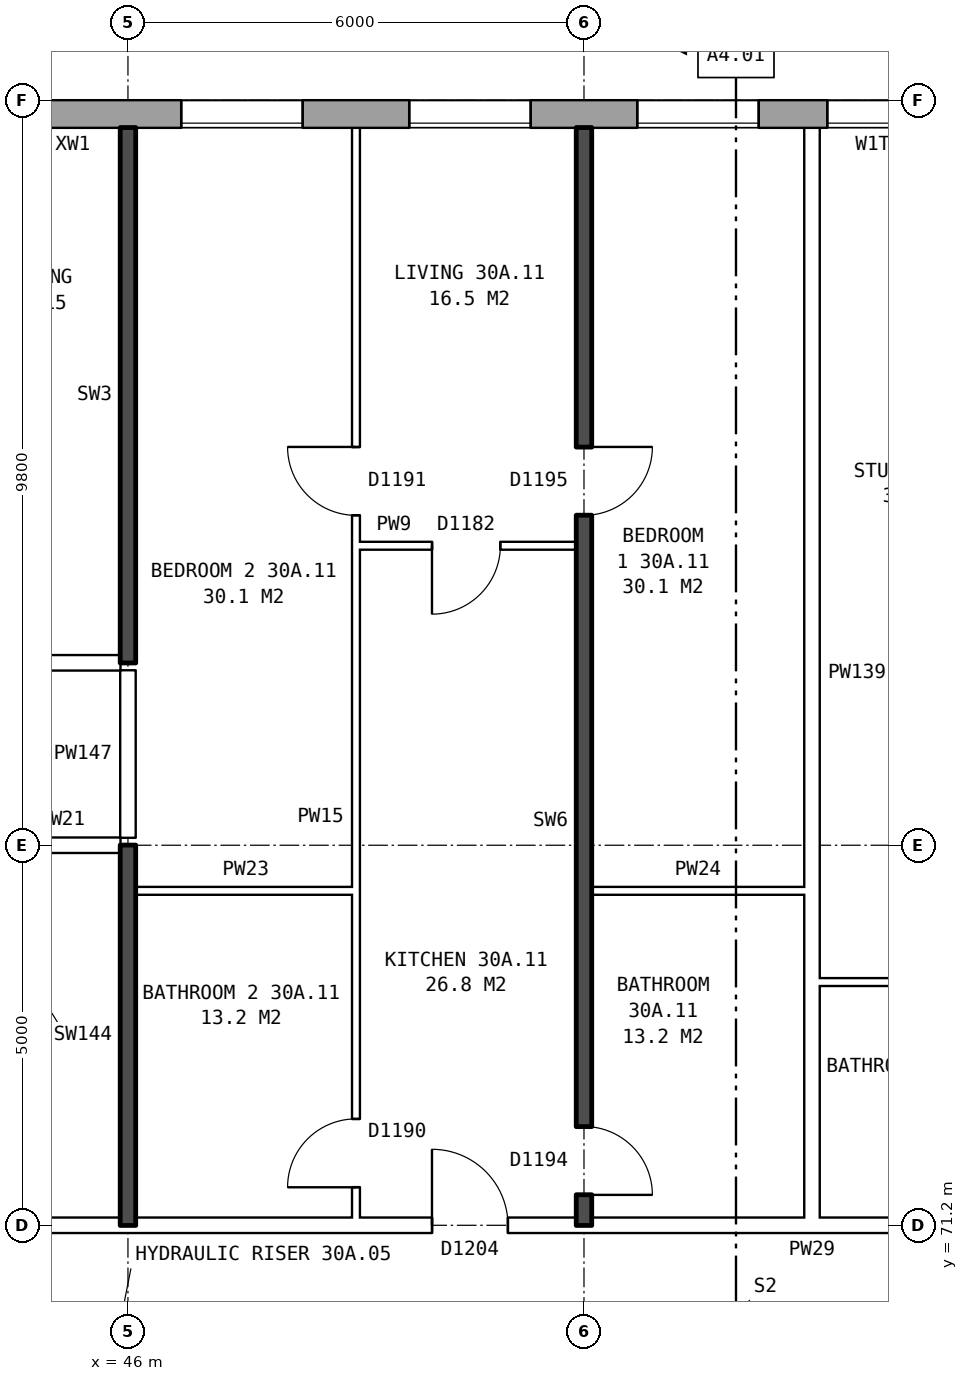
"""IFC4 building model, lengths in metres.
Left out: names, types, materials, properties, quantities, classifications, styles, units other than length and angle.
Written with IfcOpenShell. Run it as: python <this file> out.ifc"""

import sys

from ifc_helpers import new_model, si_unit, direction, frame, frame_2d, origin, place, context, subcontext, project, spatial, rectangle, extrude, element, fill, save


model = new_model("IFC4")
c1 = context("Model", 3, precision=1e-05, world=origin(), true_north=direction((0.0, 1.0)))
c2 = subcontext(c1, "Body", "Model", "MODEL_VIEW")
j1 = project(units=[si_unit("LENGTHUNIT", "METRE"), si_unit("PLANEANGLEUNIT", "RADIAN")], contexts=[c1])
p1 = place(None, origin())
s1 = spatial("IfcSite", under=j1, at=p1, CompositionType="ELEMENT")
p2 = place(p1, origin())
s2 = spatial("IfcBuilding", under=s1, at=p2, CompositionType="ELEMENT")
p3 = place(p2, frame((0.0, 0.0, 108.8)))
s3 = spatial("IfcBuildingStorey", under=s2, at=p3, CompositionType="ELEMENT", Elevation=108.8)
p4 = place(p3, frame((72.925, 85.82, 0.0), z_axis=(0.0, 0.0, 1.0), x_axis=(-1.0, 0.0, 0.0)))
e1 = element("IfcWall", 1, at=p4, inside=s3, PredefinedType="STANDARD", context=c2, shape_type="SweptSolid", body=[
    extrude(rectangle(XDim=44.851, YDim=0.36, at=frame_2d((22.425, 0.0))), origin(), (0.0, 0.0, 1.0), 2.85),
])
p5 = place(p4, frame((0.625, 0.0, 0.8)))
e2 = element("IfcOpeningElement", 2, at=p5, cuts=e1, PredefinedType="OPENING", context=c2, shape_type="SweptSolid", body=[
    extrude(rectangle(XDim=1.6, YDim=1.8, at=frame_2d((0.8, 0.9))), frame((0.0, 0.19, 0.0), z_axis=(0.0, -1.0, 0.0), x_axis=(1.0, 0.0, 0.0)), (0.0, 0.0, 1.0), 0.38),
])
p6 = place(p4, frame((3.625, 0.0, 0.8)))
e3 = element("IfcOpeningElement", 3, at=p6, cuts=e1, PredefinedType="OPENING", context=c2, shape_type="SweptSolid", body=[
    extrude(rectangle(XDim=1.6, YDim=1.8, at=frame_2d((0.8, 0.9))), frame((0.0, 0.19, 0.0), z_axis=(0.0, -1.0, 0.0), x_axis=(1.0, 0.0, 0.0)), (0.0, 0.0, 1.0), 0.38),
])
p7 = place(p4, frame((6.625, 0.0, 0.8)))
e4 = element("IfcOpeningElement", 4, at=p7, cuts=e1, PredefinedType="OPENING", context=c2, shape_type="SweptSolid", body=[
    extrude(rectangle(XDim=1.6, YDim=1.8, at=frame_2d((0.8, 0.9))), frame((0.0, 0.19, 0.0), z_axis=(0.0, -1.0, 0.0), x_axis=(1.0, 0.0, 0.0)), (0.0, 0.0, 1.0), 0.38),
])
p8 = place(p4, frame((9.625, 0.0, 0.8)))
e5 = element("IfcOpeningElement", 5, at=p8, cuts=e1, PredefinedType="OPENING", context=c2, shape_type="SweptSolid", body=[
    extrude(rectangle(XDim=1.6, YDim=1.8, at=frame_2d((0.8, 0.9))), frame((0.0, 0.19, 0.0), z_axis=(0.0, -1.0, 0.0), x_axis=(1.0, 0.0, 0.0)), (0.0, 0.0, 1.0), 0.38),
])
p9 = place(p4, frame((12.625, 0.0, 0.8)))
e6 = element("IfcOpeningElement", 6, at=p9, cuts=e1, PredefinedType="OPENING", context=c2, shape_type="SweptSolid", body=[
    extrude(rectangle(XDim=1.6, YDim=1.8, at=frame_2d((0.8, 0.9))), frame((0.0, 0.19, 0.0), z_axis=(0.0, -1.0, 0.0), x_axis=(1.0, 0.0, 0.0)), (0.0, 0.0, 1.0), 0.38),
])
p10 = place(p4, frame((15.125, 0.0, 1.65)))
e7 = element("IfcOpeningElement", 7, at=p10, cuts=e1, PredefinedType="OPENING", context=c2, shape_type="SweptSolid", body=[
    extrude(rectangle(XDim=1.0, YDim=0.9, at=frame_2d((0.5, 0.45))), frame((0.0, 0.19, 0.0), z_axis=(0.0, -1.0, 0.0), x_axis=(1.0, 0.0, 0.0)), (0.0, 0.0, 1.0), 0.38),
])
p11 = place(p4, frame((18.625, 0.0, 0.8)))
e8 = element("IfcOpeningElement", 8, at=p11, cuts=e1, PredefinedType="OPENING", context=c2, shape_type="SweptSolid", body=[
    extrude(rectangle(XDim=1.6, YDim=1.8, at=frame_2d((0.8, 0.9))), frame((0.0, 0.19, 0.0), z_axis=(0.0, -1.0, 0.0), x_axis=(1.0, 0.0, 0.0)), (0.0, 0.0, 1.0), 0.38),
])
p12 = place(p4, frame((21.625, 0.0, 0.8)))
e9 = element("IfcOpeningElement", 9, at=p12, cuts=e1, PredefinedType="OPENING", context=c2, shape_type="SweptSolid", body=[
    extrude(rectangle(XDim=1.6, YDim=1.8, at=frame_2d((0.8, 0.9))), frame((0.0, 0.19, 0.0), z_axis=(0.0, -1.0, 0.0), x_axis=(1.0, 0.0, 0.0)), (0.0, 0.0, 1.0), 0.38),
])
p13 = place(p4, frame((24.625, 0.0, 0.8)))
e10 = element("IfcOpeningElement", 10, at=p13, cuts=e1, PredefinedType="OPENING", context=c2, shape_type="SweptSolid", body=[
    extrude(rectangle(XDim=1.6, YDim=1.8, at=frame_2d((0.8, 0.9))), frame((0.0, 0.19, 0.0), z_axis=(0.0, -1.0, 0.0), x_axis=(1.0, 0.0, 0.0)), (0.0, 0.0, 1.0), 0.38),
])
p14 = place(p4, frame((29.075, 0.0, 1.4)))
e11 = element("IfcOpeningElement", 11, at=p14, cuts=e1, PredefinedType="OPENING", context=c2, shape_type="SweptSolid", body=[
    extrude(rectangle(XDim=1.2, YDim=1.2, at=frame_2d((0.6, 0.6))), frame((0.0, 0.19, 0.0), z_axis=(0.0, -1.0, 0.0), x_axis=(1.0, 0.0, 0.0)), (0.0, 0.0, 1.0), 0.38),
])
p15 = place(p4, frame((30.625, 0.0, 0.8)))
e12 = element("IfcOpeningElement", 12, at=p15, cuts=e1, PredefinedType="OPENING", context=c2, shape_type="SweptSolid", body=[
    extrude(rectangle(XDim=1.6, YDim=1.8, at=frame_2d((0.8, 0.9))), frame((0.0, 0.19, 0.0), z_axis=(0.0, -1.0, 0.0), x_axis=(1.0, 0.0, 0.0)), (0.0, 0.0, 1.0), 0.38),
])
p16 = place(p4, frame((33.625, 0.0, 0.8)))
e13 = element("IfcOpeningElement", 13, at=p16, cuts=e1, PredefinedType="OPENING", context=c2, shape_type="SweptSolid", body=[
    extrude(rectangle(XDim=1.6, YDim=1.8, at=frame_2d((0.8, 0.9))), frame((0.0, 0.19, 0.0), z_axis=(0.0, -1.0, 0.0), x_axis=(1.0, 0.0, 0.0)), (0.0, 0.0, 1.0), 0.38),
])
p17 = place(p4, frame((36.625, 0.0, 0.8)))
e14 = element("IfcOpeningElement", 14, at=p17, cuts=e1, PredefinedType="OPENING", context=c2, shape_type="SweptSolid", body=[
    extrude(rectangle(XDim=1.6, YDim=1.8, at=frame_2d((0.8, 0.9))), frame((0.0, 0.19, 0.0), z_axis=(0.0, -1.0, 0.0), x_axis=(1.0, 0.0, 0.0)), (0.0, 0.0, 1.0), 0.38),
])
p18 = place(p4, frame((39.625, 0.0, 0.8)))
e15 = element("IfcOpeningElement", 15, at=p18, cuts=e1, PredefinedType="OPENING", context=c2, shape_type="SweptSolid", body=[
    extrude(rectangle(XDim=1.6, YDim=1.8, at=frame_2d((0.8, 0.9))), frame((0.0, 0.19, 0.0), z_axis=(0.0, -1.0, 0.0), x_axis=(1.0, 0.0, 0.0)), (0.0, 0.0, 1.0), 0.38),
])
p19 = place(p4, frame((42.625, 0.0, 0.8)))
e16 = element("IfcOpeningElement", 16, at=p19, cuts=e1, PredefinedType="OPENING", context=c2, shape_type="SweptSolid", body=[
    extrude(rectangle(XDim=1.6, YDim=1.8, at=frame_2d((0.8, 0.9))), frame((0.0, 0.19, 0.0), z_axis=(0.0, -1.0, 0.0), x_axis=(1.0, 0.0, 0.0)), (0.0, 0.0, 1.0), 0.38),
])
p20 = place(p4, frame((16.525, 0.0, 0.15)))
e17 = element("IfcOpeningElement", 17, at=p20, cuts=e1, PredefinedType="OPENING", context=c2, shape_type="SweptSolid", body=[
    extrude(rectangle(XDim=1.2, YDim=0.9, at=frame_2d((0.6, 0.45))), frame((0.0, 0.19, 0.0), z_axis=(0.0, -1.0, 0.0), x_axis=(1.0, 0.0, 0.0)), (0.0, 0.0, 1.0), 0.38),
])
p21 = place(p3, frame((44.36, 71.2, 0.0), z_axis=(0.0, 0.0, 1.0), x_axis=(1.0, 0.0, 0.0)))
e18 = element("IfcWall", 18, at=p21, inside=s3, PredefinedType="PARTITIONING", context=c2, shape_type="SweptSolid", body=[
    extrude(rectangle(XDim=19.28, YDim=0.2, at=frame_2d((9.64, 0.0))), origin(), (0.0, 0.0, 1.0), 2.85),
])
p22 = place(p21, frame((14.64, 0.0, 0.0)))
e19 = element("IfcOpeningElement", 19, at=p22, cuts=e18, PredefinedType="OPENING", context=c2, shape_type="SweptSolid", body=[
    extrude(rectangle(XDim=1.0, YDim=2.1, at=frame_2d((0.5, 1.05))), frame((0.0, 0.11, 0.0), z_axis=(0.0, -1.0, 0.0), x_axis=(1.0, 0.0, 0.0)), (0.0, 0.0, 1.0), 0.22),
])
p23 = place(p21, frame((5.64, 0.0, 0.0)))
e20 = element("IfcOpeningElement", 20, at=p23, cuts=e18, PredefinedType="OPENING", context=c2, shape_type="SweptSolid", body=[
    extrude(rectangle(XDim=1.0, YDim=2.1, at=frame_2d((0.5, 1.05))), frame((0.0, 0.11, 0.0), z_axis=(0.0, -1.0, 0.0), x_axis=(1.0, 0.0, 0.0)), (0.0, 0.0, 1.0), 0.22),
])
p24 = place(p3, frame((55.1, 74.4, 0.0), z_axis=(0.0, 0.0, 1.0), x_axis=(1.0, 0.0, 0.0)))
e21 = element("IfcWall", 21, at=p24, inside=s3, PredefinedType="PARTITIONING", context=c2, shape_type="SweptSolid", body=[
    extrude(rectangle(XDim=2.8, YDim=0.1, at=frame_2d((1.4, 0.0))), origin(), (0.0, 0.0, 1.0), 2.85),
])
p25 = place(p3, frame((46.1, 75.6, 0.0), z_axis=(0.0, 0.0, 1.0), x_axis=(1.0, 0.0, 0.0)))
e22 = element("IfcWall", 22, at=p25, inside=s3, PredefinedType="PARTITIONING", context=c2, shape_type="SweptSolid", body=[
    extrude(rectangle(XDim=2.9, YDim=0.1, at=frame_2d((1.45, 0.0))), origin(), (0.0, 0.0, 1.0), 2.85),
])
p26 = place(p3, frame((52.1, 75.6, 0.0), z_axis=(0.0, 0.0, 1.0), x_axis=(1.0, 0.0, 0.0)))
e23 = element("IfcWall", 23, at=p26, inside=s3, PredefinedType="PARTITIONING", context=c2, shape_type="SweptSolid", body=[
    extrude(rectangle(XDim=2.8, YDim=0.1, at=frame_2d((1.4, 0.0))), origin(), (0.0, 0.0, 1.0), 2.85),
])
p27 = place(p3, frame((44.36, 76.2, 0.0), z_axis=(0.0, 0.0, 1.0), x_axis=(1.0, 0.0, 0.0)))
e24 = element("IfcWall", 24, at=p27, inside=s3, PredefinedType="PARTITIONING", context=c2, shape_type="SweptSolid", body=[
    extrude(rectangle(XDim=1.54, YDim=0.2, at=frame_2d((0.77, 0.0))), origin(), (0.0, 0.0, 1.0), 2.85),
])
p28 = place(p3, frame((25.36, 78.6, 0.0), z_axis=(0.0, 0.0, 1.0), x_axis=(1.0, 0.0, 0.0)))
e25 = element("IfcWall", 25, at=p28, inside=s3, PredefinedType="PARTITIONING", context=c2, shape_type="SweptSolid", body=[
    extrude(rectangle(XDim=20.54, YDim=0.2, at=frame_2d((10.27, 0.0))), origin(), (0.0, 0.0, 1.0), 2.85),
])
p29 = place(p28, frame((18.09, 0.0, 0.0)))
e26 = element("IfcOpeningElement", 26, at=p29, cuts=e25, PredefinedType="OPENING", context=c2, shape_type="SweptSolid", body=[
    extrude(rectangle(XDim=1.0, YDim=2.1, at=frame_2d((0.5, 1.05))), frame((0.0, 0.11, 0.0), z_axis=(0.0, -1.0, 0.0), x_axis=(1.0, 0.0, 0.0)), (0.0, 0.0, 1.0), 0.22),
])
p30 = place(p28, frame((12.14, 0.0, 0.0)))
e27 = element("IfcOpeningElement", 27, at=p30, cuts=e25, PredefinedType="OPENING", context=c2, shape_type="SweptSolid", body=[
    extrude(rectangle(XDim=1.0, YDim=2.1, at=frame_2d((0.5, 1.05))), frame((0.0, 0.11, 0.0), z_axis=(0.0, -1.0, 0.0), x_axis=(1.0, 0.0, 0.0)), (0.0, 0.0, 1.0), 0.22),
])
p31 = place(p28, frame((6.34, 0.0, 0.0)))
e28 = element("IfcOpeningElement", 28, at=p31, cuts=e25, PredefinedType="OPENING", context=c2, shape_type="SweptSolid", body=[
    extrude(rectangle(XDim=1.0, YDim=2.1, at=frame_2d((0.5, 1.05))), frame((0.0, 0.11, 0.0), z_axis=(0.0, -1.0, 0.0), x_axis=(1.0, 0.0, 0.0)), (0.0, 0.0, 1.0), 0.22),
])
p32 = place(p3, frame((49.0, 80.14, 0.0), z_axis=(0.0, 0.0, 1.0), x_axis=(1.0, 0.0, 0.0)))
e29 = element("IfcWall", 29, at=p32, inside=s3, PredefinedType="PARTITIONING", context=c2, shape_type="SweptSolid", body=[
    extrude(rectangle(XDim=2.9, YDim=0.1, at=frame_2d((1.45, 0.0))), origin(), (0.0, 0.0, 1.0), 2.85),
])
p33 = place(p32, frame((1.0, 0.0, 0.0)))
e30 = element("IfcOpeningElement", 30, at=p33, cuts=e29, PredefinedType="OPENING", context=c2, shape_type="SweptSolid", body=[
    extrude(rectangle(XDim=0.9, YDim=2.1, at=frame_2d((0.45, 1.05))), frame((0.0, 0.06, 0.0), z_axis=(0.0, -1.0, 0.0), x_axis=(1.0, 0.0, 0.0)), (0.0, 0.0, 1.0), 0.12),
])
p34 = place(p3, frame((46.0, 71.2, 0.0), z_axis=(0.0, 0.0, 1.0), x_axis=(0.0, 1.0, 0.0)))
e31 = element("IfcWall", 31, at=p34, inside=s3, PredefinedType="SOLIDWALL", context=c2, shape_type="SweptSolid", body=[
    extrude(rectangle(XDim=5.0, YDim=0.2, at=frame_2d((2.5, 0.0))), origin(), (0.0, 0.0, 1.0), 2.85),
])
p35 = place(p3, frame((46.0, 76.3, 0.0), z_axis=(0.0, 0.0, 1.0), x_axis=(0.0, 1.0, 0.0)))
e32 = element("IfcWall", 32, at=p35, inside=s3, PredefinedType="PARTITIONING", context=c2, shape_type="SweptSolid", body=[
    extrude(rectangle(XDim=2.2, YDim=0.2, at=frame_2d((1.1, 0.0))), origin(), (0.0, 0.0, 1.0), 2.85),
])
p36 = place(p3, frame((46.0, 78.6, 0.0), z_axis=(0.0, 0.0, 1.0), x_axis=(0.0, 1.0, 0.0)))
e33 = element("IfcWall", 33, at=p36, inside=s3, PredefinedType="SOLIDWALL", context=c2, shape_type="SweptSolid", body=[
    extrude(rectangle(XDim=7.04, YDim=0.2, at=frame_2d((3.52, 0.0))), origin(), (0.0, 0.0, 1.0), 2.85),
])
p37 = place(p3, frame((49.0, 71.3, 0.0), z_axis=(0.0, 0.0, 1.0), x_axis=(0.0, 1.0, 0.0)))
e34 = element("IfcWall", 34, at=p37, inside=s3, PredefinedType="PARTITIONING", context=c2, shape_type="SweptSolid", body=[
    extrude(rectangle(XDim=14.34, YDim=0.1, at=frame_2d((7.17, 0.0))), origin(), (0.0, 0.0, 1.0), 2.85),
])
p38 = place(p37, frame((9.24, 0.0, 0.0)))
e35 = element("IfcOpeningElement", 35, at=p38, cuts=e34, PredefinedType="OPENING", context=c2, shape_type="SweptSolid", body=[
    extrude(rectangle(XDim=0.9, YDim=2.1, at=frame_2d((0.45, 1.05))), frame((0.0, 0.06, 0.0), z_axis=(0.0, -1.0, 0.0), x_axis=(1.0, 0.0, 0.0)), (0.0, 0.0, 1.0), 0.12),
])
p39 = place(p37, frame((0.4, 0.0, 0.0)))
e36 = element("IfcOpeningElement", 36, at=p39, cuts=e34, PredefinedType="OPENING", context=c2, shape_type="SweptSolid", body=[
    extrude(rectangle(XDim=0.9, YDim=2.1, at=frame_2d((0.45, 1.05))), frame((0.0, 0.06, 0.0), z_axis=(0.0, -1.0, 0.0), x_axis=(1.0, 0.0, 0.0)), (0.0, 0.0, 1.0), 0.12),
])
p40 = place(p3, frame((52.0, 71.2, 0.0), z_axis=(0.0, 0.0, 1.0), x_axis=(0.0, 1.0, 0.0)))
e37 = element("IfcWall", 37, at=p40, inside=s3, PredefinedType="SOLIDWALL", context=c2, shape_type="SweptSolid", body=[
    extrude(rectangle(XDim=14.44, YDim=0.2, at=frame_2d((7.22, 0.0))), origin(), (0.0, 0.0, 1.0), 2.85),
])
p41 = place(p40, frame((9.34, 0.0, 0.0)))
e38 = element("IfcOpeningElement", 38, at=p41, cuts=e37, PredefinedType="OPENING", context=c2, shape_type="SweptSolid", body=[
    extrude(rectangle(XDim=0.9, YDim=2.1, at=frame_2d((0.45, 1.05))), frame((0.0, 0.11, 0.0), z_axis=(0.0, -1.0, 0.0), x_axis=(1.0, 0.0, 0.0)), (0.0, 0.0, 1.0), 0.22),
])
p42 = place(p40, frame((0.4, 0.0, 0.0)))
e39 = element("IfcOpeningElement", 39, at=p42, cuts=e37, PredefinedType="OPENING", context=c2, shape_type="SweptSolid", body=[
    extrude(rectangle(XDim=0.9, YDim=2.1, at=frame_2d((0.45, 1.05))), frame((0.0, 0.11, 0.0), z_axis=(0.0, -1.0, 0.0), x_axis=(1.0, 0.0, 0.0)), (0.0, 0.0, 1.0), 0.22),
])
p43 = place(p3, frame((55.0, 71.3, 0.0), z_axis=(0.0, 0.0, 1.0), x_axis=(0.0, 1.0, 0.0)))
e40 = element("IfcWall", 40, at=p43, inside=s3, PredefinedType="PARTITIONING", context=c2, shape_type="SweptSolid", body=[
    extrude(rectangle(XDim=14.34, YDim=0.2, at=frame_2d((7.17, 0.0))), origin(), (0.0, 0.0, 1.0), 2.85),
])
p44 = place(p11, origin())
e41 = element("IfcWindow", 41, at=p44, inside=s3, PartitioningType="SINGLE_PANEL", PredefinedType="WINDOW", context=c2, shape_type="SweptSolid", body=[
    extrude(rectangle(XDim=1.6, YDim=1.8, at=frame_2d((0.8, 0.9))), frame((0.0, 0.15, 0.0), z_axis=(0.0, -1.0, 0.0), x_axis=(1.0, 0.0, 0.0)), (0.0, 0.0, 1.0), 0.06),
])
fill(e8, e41)
p45 = place(p12, origin())
e42 = element("IfcWindow", 42, at=p45, inside=s3, PartitioningType="SINGLE_PANEL", PredefinedType="WINDOW", context=c2, shape_type="SweptSolid", body=[
    extrude(rectangle(XDim=1.6, YDim=1.8, at=frame_2d((0.8, 0.9))), frame((0.0, 0.15, 0.0), z_axis=(0.0, -1.0, 0.0), x_axis=(1.0, 0.0, 0.0)), (0.0, 0.0, 1.0), 0.06),
])
fill(e9, e42)
p46 = place(p13, origin())
e43 = element("IfcWindow", 43, at=p46, inside=s3, PartitioningType="SINGLE_PANEL", PredefinedType="WINDOW", context=c2, shape_type="SweptSolid", body=[
    extrude(rectangle(XDim=1.6, YDim=1.8, at=frame_2d((0.8, 0.9))), frame((0.0, 0.15, 0.0), z_axis=(0.0, -1.0, 0.0), x_axis=(1.0, 0.0, 0.0)), (0.0, 0.0, 1.0), 0.06),
])
fill(e10, e43)
p47 = place(p41, frame((0.9, 0.0, 0.0), z_axis=(0.0, 0.0, 1.0), x_axis=(-1.0, 0.0, 0.0)))
e44 = element("IfcDoor", 44, at=p47, inside=s3, OperationType="SINGLE_SWING_LEFT", PredefinedType="DOOR", context=c2, shape_type="SweptSolid", body=[
    extrude(rectangle(XDim=0.9, YDim=2.1, at=frame_2d((0.45, 1.05))), frame((0.0, 0.025, 0.0), z_axis=(0.0, -1.0, 0.0), x_axis=(1.0, 0.0, 0.0)), (0.0, 0.0, 1.0), 0.05),
])
fill(e38, e44)
p48 = place(p38, origin())
e45 = element("IfcDoor", 45, at=p48, inside=s3, OperationType="SINGLE_SWING_RIGHT", PredefinedType="DOOR", context=c2, shape_type="SweptSolid", body=[
    extrude(rectangle(XDim=0.9, YDim=2.1, at=frame_2d((0.45, 1.05))), frame((0.0, 0.025, 0.0), z_axis=(0.0, -1.0, 0.0), x_axis=(1.0, 0.0, 0.0)), (0.0, 0.0, 1.0), 0.05),
])
fill(e35, e45)
p49 = place(p23, origin())
e46 = element("IfcDoor", 46, at=p49, inside=s3, OperationType="SINGLE_SWING_LEFT", PredefinedType="DOOR", context=c2, shape_type="SweptSolid", body=[
    extrude(rectangle(XDim=1.0, YDim=2.1, at=frame_2d((0.5, 1.05))), frame((0.0, 0.025, 0.0), z_axis=(0.0, -1.0, 0.0), x_axis=(1.0, 0.0, 0.0)), (0.0, 0.0, 1.0), 0.05),
])
fill(e20, e46)
p50 = place(p33, frame((0.9, 0.0, 0.0), z_axis=(0.0, 0.0, 1.0), x_axis=(-1.0, 0.0, 0.0)))
e47 = element("IfcDoor", 47, at=p50, inside=s3, OperationType="SINGLE_SWING_RIGHT", PredefinedType="DOOR", context=c2, shape_type="SweptSolid", body=[
    extrude(rectangle(XDim=0.9, YDim=2.1, at=frame_2d((0.45, 1.05))), frame((0.0, 0.025, 0.0), z_axis=(0.0, -1.0, 0.0), x_axis=(1.0, 0.0, 0.0)), (0.0, 0.0, 1.0), 0.05),
])
fill(e30, e47)
p51 = place(p42, frame((0.9, 0.0, 0.0), z_axis=(0.0, 0.0, 1.0), x_axis=(-1.0, 0.0, 0.0)))
e48 = element("IfcDoor", 48, at=p51, inside=s3, OperationType="SINGLE_SWING_RIGHT", PredefinedType="DOOR", context=c2, shape_type="SweptSolid", body=[
    extrude(rectangle(XDim=0.9, YDim=2.1, at=frame_2d((0.45, 1.05))), frame((0.0, 0.025, 0.0), z_axis=(0.0, -1.0, 0.0), x_axis=(1.0, 0.0, 0.0)), (0.0, 0.0, 1.0), 0.05),
])
fill(e39, e48)
p52 = place(p39, origin())
e49 = element("IfcDoor", 49, at=p52, inside=s3, OperationType="SINGLE_SWING_LEFT", PredefinedType="DOOR", context=c2, shape_type="SweptSolid", body=[
    extrude(rectangle(XDim=0.9, YDim=2.1, at=frame_2d((0.45, 1.05))), frame((0.0, 0.025, 0.0), z_axis=(0.0, -1.0, 0.0), x_axis=(1.0, 0.0, 0.0)), (0.0, 0.0, 1.0), 0.05),
])
fill(e36, e49)
p53 = place(p20, origin())
e50 = element("IfcWindow", 50, at=p53, inside=s3, PartitioningType="SINGLE_PANEL", PredefinedType="WINDOW", context=c2, shape_type="SweptSolid", body=[
    extrude(rectangle(XDim=1.2, YDim=0.9, at=frame_2d((0.6, 0.45))), frame((0.0, 0.15, 0.0), z_axis=(0.0, -1.0, 0.0), x_axis=(1.0, 0.0, 0.0)), (0.0, 0.0, 1.0), 0.06),
])
fill(e17, e50)
save(model, sys.argv[1])
